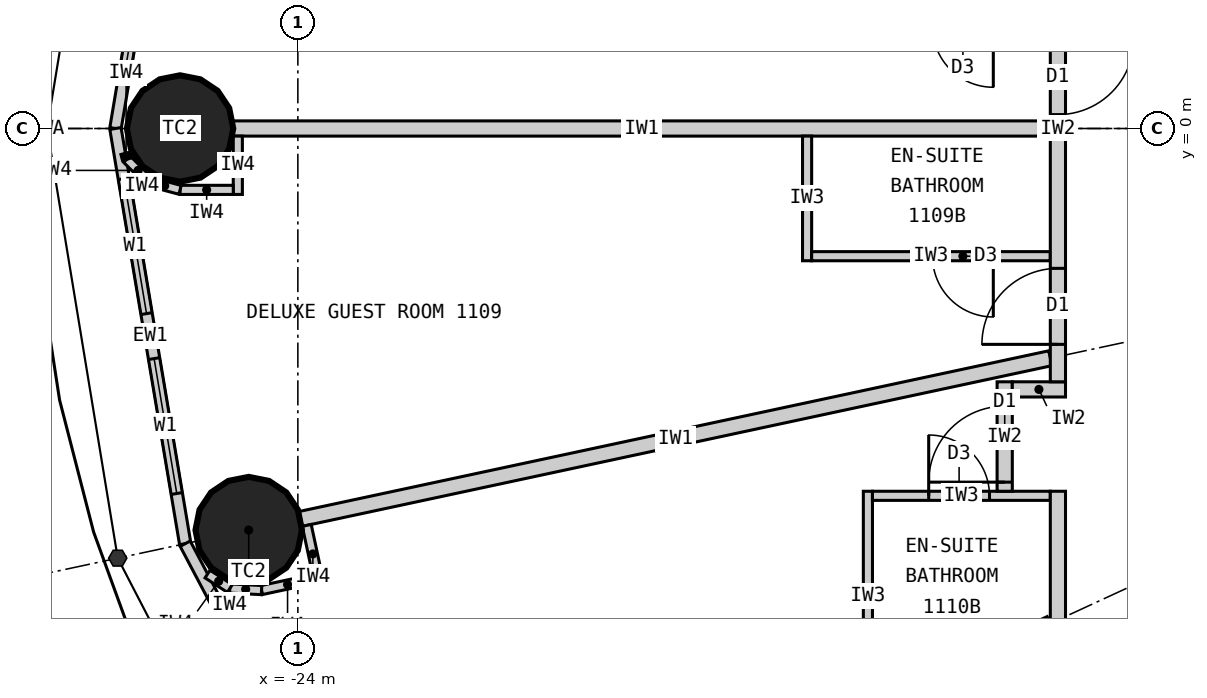
"""IFC4 building model, lengths in metres.
Left out: names, types, materials, properties, quantities, classifications, styles, units other than length and angle.
Written with IfcOpenShell. Run it as: python <this file> out.ifc"""

import sys

from ifc_helpers import new_model, si_unit, direction, frame, frame_2d, origin, origin_2d, place, context, subcontext, project, spatial, rectangle, circle, extrude, element, fill, save


model = new_model("IFC4")
c1 = context("Model", 3, precision=1e-05, world=origin(), true_north=direction((0.0, 1.0)))
c2 = subcontext(c1, "Body", "Model", "MODEL_VIEW")
j1 = project(units=[si_unit("LENGTHUNIT", "METRE"), si_unit("PLANEANGLEUNIT", "RADIAN")], contexts=[c1])
p1 = place(None, origin())
s1 = spatial("IfcSite", under=j1, at=p1, CompositionType="ELEMENT")
p2 = place(p1, origin())
s2 = spatial("IfcBuilding", under=s1, at=p2, CompositionType="ELEMENT")
p3 = place(p2, frame((0.0, 0.0, 50.7)))
s3 = spatial("IfcBuildingStorey", under=s2, at=p3, CompositionType="ELEMENT", Elevation=50.7)
for number, where, z_axis, x_axis in (
    (1, (-25.55, 0.0, 0.0), (0.0, 0.0, 1.0), (1.0, 0.0, 0.0)),
    (2, (-24.647, -5.283, 0.0), (0.0, 0.0, 1.0), (1.0, 0.0, 0.0)),
):
    element("IfcColumn", number, at=place(p3, frame(where, z_axis=z_axis, x_axis=x_axis)), inside=s3, PredefinedType="COLUMN", context=c2, shape_type="SweptSolid", body=[
        extrude(circle(Radius=0.7, at=origin_2d()), origin(), (0.0, 0.0, 1.0), 3.3),
    ])
p4 = place(p3, frame((-25.482, 5.462, 0.0), z_axis=(0.0, 0.0, 1.0), x_axis=(-0.165642551694, -0.986185857264, 0.0)))
e3 = element("IfcWall", 3, at=p4, inside=s3, PredefinedType="ELEMENTEDWALL", context=c2, shape_type="SweptSolid", body=[
    extrude(rectangle(XDim=5.539, YDim=0.15, at=frame_2d((2.77, 0.0))), origin(), (0.0, 0.0, 1.0), 3.12),
])
p5 = place(p4, frame((0.669, 0.0, 0.9)))
e4 = element("IfcOpeningElement", 4, at=p5, cuts=e3, PredefinedType="OPENING", context=c2, shape_type="SweptSolid", body=[
    extrude(rectangle(XDim=1.8, YDim=1.9, at=frame_2d((0.9, 0.95))), frame((0.0, 0.085, 0.0), z_axis=(0.0, -1.0, 0.0), x_axis=(1.0, 0.0, 0.0)), (0.0, 0.0, 1.0), 0.17),
])
p6 = place(p4, frame((3.07, 0.0, 0.9)))
e5 = element("IfcOpeningElement", 5, at=p6, cuts=e3, PredefinedType="OPENING", context=c2, shape_type="SweptSolid", body=[
    extrude(rectangle(XDim=1.8, YDim=1.9, at=frame_2d((0.9, 0.95))), frame((0.0, 0.085, 0.0), z_axis=(0.0, -1.0, 0.0), x_axis=(1.0, 0.0, 0.0)), (0.0, 0.0, 1.0), 0.17),
])
p7 = place(p3, frame((-26.4, 0.0, 0.0), z_axis=(0.0, 0.0, 1.0), x_axis=(0.165642551694, -0.986185857264, 0.0)))
e6 = element("IfcWall", 6, at=p7, inside=s3, PredefinedType="ELEMENTEDWALL", context=c2, shape_type="SweptSolid", body=[
    extrude(rectangle(XDim=5.539, YDim=0.15, at=frame_2d((2.77, 0.0))), origin(), (0.0, 0.0, 1.0), 3.12),
])
p8 = place(p7, frame((0.669, 0.0, 0.9)))
e7 = element("IfcOpeningElement", 7, at=p8, cuts=e6, PredefinedType="OPENING", context=c2, shape_type="SweptSolid", body=[
    extrude(rectangle(XDim=1.8, YDim=1.9, at=frame_2d((0.9, 0.95))), frame((0.0, 0.085, 0.0), z_axis=(0.0, -1.0, 0.0), x_axis=(1.0, 0.0, 0.0)), (0.0, 0.0, 1.0), 0.17),
])
p9 = place(p7, frame((3.07, 0.0, 0.9)))
e8 = element("IfcOpeningElement", 8, at=p9, cuts=e6, PredefinedType="OPENING", context=c2, shape_type="SweptSolid", body=[
    extrude(rectangle(XDim=1.8, YDim=1.9, at=frame_2d((0.9, 0.95))), frame((0.0, 0.085, 0.0), z_axis=(0.0, -1.0, 0.0), x_axis=(1.0, 0.0, 0.0)), (0.0, 0.0, 1.0), 0.17),
])
p10 = place(p3, frame((-25.482, -5.462, 0.0), z_axis=(0.0, 0.0, 1.0), x_axis=(0.467296867008, -0.884100468321, 0.0)))
e9 = element("IfcWall", 9, at=p10, inside=s3, PredefinedType="ELEMENTEDWALL", context=c2, shape_type="SweptSolid", body=[
    extrude(rectangle(XDim=5.734, YDim=0.15, at=frame_2d((2.867, 0.0))), origin(), (0.0, 0.0, 1.0), 3.12),
])
p11 = place(p10, frame((0.767, 0.0, 0.9)))
e10 = element("IfcOpeningElement", 10, at=p11, cuts=e9, PredefinedType="OPENING", context=c2, shape_type="SweptSolid", body=[
    extrude(rectangle(XDim=1.8, YDim=1.9, at=frame_2d((0.9, 0.95))), frame((0.0, 0.085, 0.0), z_axis=(0.0, -1.0, 0.0), x_axis=(1.0, 0.0, 0.0)), (0.0, 0.0, 1.0), 0.17),
])
p12 = place(p10, frame((3.167, 0.0, 0.9)))
e11 = element("IfcOpeningElement", 11, at=p12, cuts=e9, PredefinedType="OPENING", context=c2, shape_type="SweptSolid", body=[
    extrude(rectangle(XDim=1.8, YDim=1.9, at=frame_2d((0.9, 0.95))), frame((0.0, 0.085, 0.0), z_axis=(0.0, -1.0, 0.0), x_axis=(1.0, 0.0, 0.0)), (0.0, 0.0, 1.0), 0.17),
])
p13 = place(p3, frame((-14.1, 0.0, 0.0), z_axis=(0.0, 0.0, 1.0), x_axis=(-1.0, 0.0, 0.0)))
e12 = element("IfcWall", 12, at=p13, inside=s3, PredefinedType="PARTITIONING", context=c2, shape_type="SweptSolid", body=[
    extrude(rectangle(XDim=10.75, YDim=0.2, at=frame_2d((5.375, 0.0))), origin(), (0.0, 0.0, 1.0), 2.27),
])
p14 = place(p3, frame((-14.1, -3.022, 0.0), z_axis=(0.0, 0.0, 1.0), x_axis=(-0.977790014929, -0.209586943072, 0.0)))
e13 = element("IfcWall", 13, at=p14, inside=s3, PredefinedType="PARTITIONING", context=c2, shape_type="SweptSolid", body=[
    extrude(rectangle(XDim=10.087, YDim=0.2, at=frame_2d((5.043, 0.0))), origin(), (0.0, 0.0, 1.0), 2.32),
])
p15 = place(p3, frame((-14.1, -6.512, 0.0), z_axis=(0.0, 0.0, 1.0), x_axis=(-0.907832871056, -0.419332181247, 0.0)))
e14 = element("IfcWall", 14, at=p15, inside=s3, PredefinedType="PARTITIONING", context=c2, shape_type="SweptSolid", body=[
    extrude(rectangle(XDim=8.023, YDim=0.2, at=frame_2d((4.011, 0.0))), origin(), (0.0, 0.0, 1.0), 2.32),
])
p16 = place(p3, frame((-17.3, -0.1, 0.0), z_axis=(0.0, 0.0, 1.0), x_axis=(0.0, -1.0, 0.0)))
e15 = element("IfcWall", 15, at=p16, inside=s3, PredefinedType="PARTITIONING", context=c2, shape_type="SweptSolid", body=[
    extrude(rectangle(XDim=1.64, YDim=0.12, at=frame_2d((0.82, 0.0))), origin(), (0.0, 0.0, 1.0), 3.12),
])
p17 = place(p3, frame((-14.1, -1.68, 0.0), z_axis=(0.0, 0.0, 1.0), x_axis=(-1.0, 0.0, 0.0)))
e16 = element("IfcWall", 16, at=p17, inside=s3, PredefinedType="PARTITIONING", context=c2, shape_type="SweptSolid", body=[
    extrude(rectangle(XDim=3.14, YDim=0.12, at=frame_2d((1.57, 0.0))), origin(), (0.0, 0.0, 1.0), 3.12),
])
p18 = place(p17, frame((0.75, 0.0, 0.0)))
e17 = element("IfcOpeningElement", 17, at=p18, cuts=e16, PredefinedType="OPENING", context=c2, shape_type="SweptSolid", body=[
    extrude(rectangle(XDim=0.8, YDim=2.1, at=frame_2d((0.4, 1.05))), frame((0.0, 0.07, 0.0), z_axis=(0.0, -1.0, 0.0), x_axis=(1.0, 0.0, 0.0)), (0.0, 0.0, 1.0), 0.14),
])
p19 = place(p3, frame((-16.5, -7.521, 0.0), z_axis=(0.0, 0.0, 1.0), x_axis=(0.0, 1.0, 0.0)))
e18 = element("IfcWall", 18, at=p19, inside=s3, PredefinedType="PARTITIONING", context=c2, shape_type="SweptSolid", body=[
    extrude(rectangle(XDim=2.749, YDim=0.12, at=frame_2d((1.374, 0.0))), origin(), (0.0, 0.0, 1.0), 3.12),
])
p20 = place(p3, frame((-14.1, -4.833, 0.0), z_axis=(0.0, 0.0, 1.0), x_axis=(-1.0, 0.0, 0.0)))
e19 = element("IfcWall", 19, at=p20, inside=s3, PredefinedType="PARTITIONING", context=c2, shape_type="SweptSolid", body=[
    extrude(rectangle(XDim=2.34, YDim=0.12, at=frame_2d((1.17, 0.0))), origin(), (0.0, 0.0, 1.0), 3.12),
])
p21 = place(p20, frame((0.8, 0.0, 0.0)))
e20 = element("IfcOpeningElement", 20, at=p21, cuts=e19, PredefinedType="OPENING", context=c2, shape_type="SweptSolid", body=[
    extrude(rectangle(XDim=0.8, YDim=2.1, at=frame_2d((0.4, 1.05))), frame((0.0, 0.07, 0.0), z_axis=(0.0, -1.0, 0.0), x_axis=(1.0, 0.0, 0.0)), (0.0, 0.0, 1.0), 0.14),
])
p22 = place(p3, frame((-14.7, -3.333, 0.0), z_axis=(0.0, 0.0, 1.0), x_axis=(0.0, -1.0, 0.0)))
e21 = element("IfcWall", 21, at=p22, inside=s3, PredefinedType="PARTITIONING", context=c2, shape_type="SweptSolid", body=[
    extrude(rectangle(XDim=1.44, YDim=0.2, at=frame_2d((0.72, 0.0))), origin(), (0.0, 0.0, 1.0), 3.12),
])
p23 = place(p22, frame((0.32, 0.0, 0.0)))
e22 = element("IfcOpeningElement", 22, at=p23, cuts=e21, PredefinedType="OPENING", context=c2, shape_type="SweptSolid", body=[
    extrude(rectangle(XDim=1.0, YDim=2.2, at=frame_2d((0.5, 1.1))), frame((0.0, 0.11, 0.0), z_axis=(0.0, -1.0, 0.0), x_axis=(1.0, 0.0, 0.0)), (0.0, 0.0, 1.0), 0.22),
])
p24 = place(p3, frame((-13.9, -3.433, 0.0), z_axis=(0.0, 0.0, 1.0), x_axis=(-1.0, 0.0, 0.0)))
e23 = element("IfcWall", 23, at=p24, inside=s3, PredefinedType="PARTITIONING", context=c2, shape_type="SweptSolid", body=[
    extrude(rectangle(XDim=0.7, YDim=0.2, at=frame_2d((0.35, 0.0))), origin(), (0.0, 0.0, 1.0), 2.32),
])
p25 = place(p3, frame((-14.0, 3.333, 0.0), z_axis=(0.0, 0.0, 1.0), x_axis=(0.0, -1.0, 0.0)))
e24 = element("IfcWall", 24, at=p25, inside=s3, PredefinedType="PARTITIONING", context=c2, shape_type="SweptSolid", body=[
    extrude(rectangle(XDim=6.665, YDim=0.2, at=frame_2d((3.333, 0.0))), origin(), (0.0, 0.0, 1.0), 3.12),
])
p26 = place(p25, frame((2.15, 0.0, 0.0)))
e25 = element("IfcOpeningElement", 25, at=p26, cuts=e24, PredefinedType="OPENING", context=c2, shape_type="SweptSolid", body=[
    extrude(rectangle(XDim=1.0, YDim=2.2, at=frame_2d((0.5, 1.1))), frame((0.0, 0.11, 0.0), z_axis=(0.0, -1.0, 0.0), x_axis=(1.0, 0.0, 0.0)), (0.0, 0.0, 1.0), 0.22),
])
p27 = place(p25, frame((5.173, 0.0, 0.0)))
e26 = element("IfcOpeningElement", 26, at=p27, cuts=e24, PredefinedType="OPENING", context=c2, shape_type="SweptSolid", body=[
    extrude(rectangle(XDim=1.0, YDim=2.2, at=frame_2d((0.5, 1.1))), frame((0.0, 0.11, 0.0), z_axis=(0.0, -1.0, 0.0), x_axis=(1.0, 0.0, 0.0)), (0.0, 0.0, 1.0), 0.22),
])
p28 = place(p3, frame((-14.0, -4.772, 0.0), z_axis=(0.0, 0.0, 1.0), x_axis=(0.0, -1.0, 0.0)))
e27 = element("IfcWall", 27, at=p28, inside=s3, PredefinedType="PARTITIONING", context=c2, shape_type="SweptSolid", body=[
    extrude(rectangle(XDim=5.127, YDim=0.2, at=frame_2d((2.564, 0.0))), origin(), (0.0, 0.0, 1.0), 3.12),
])
p29 = place(p28, frame((4.025, 0.0, 0.0)))
e28 = element("IfcOpeningElement", 28, at=p29, cuts=e27, PredefinedType="OPENING", context=c2, shape_type="SweptSolid", body=[
    extrude(rectangle(XDim=1.0, YDim=2.2, at=frame_2d((0.5, 1.1))), frame((0.0, 0.11, 0.0), z_axis=(0.0, -1.0, 0.0), x_axis=(1.0, 0.0, 0.0)), (0.0, 0.0, 1.0), 0.22),
])
p30 = place(p3, frame((-24.79, -0.1, 0.0), z_axis=(0.0, 0.0, 1.0), x_axis=(0.0, -1.0, 0.0)))
e29 = element("IfcWall", 29, at=p30, inside=s3, PredefinedType="PARTITIONING", context=c2, shape_type="SweptSolid", body=[
    extrude(rectangle(XDim=0.767, YDim=0.12, at=frame_2d((0.384, 0.0))), origin(), (0.0, 0.0, 1.0), 3.12),
])
p31 = place(p3, frame((-24.85, -0.808, 0.0), z_axis=(0.0, 0.0, 1.0), x_axis=(-1.0, 0.0, 0.0)))
e30 = element("IfcWall", 30, at=p31, inside=s3, PredefinedType="PARTITIONING", context=c2, shape_type="SweptSolid", body=[
    extrude(rectangle(XDim=0.7, YDim=0.12, at=frame_2d((0.35, 0.0))), origin(), (0.0, 0.0, 1.0), 3.12),
])
p32 = place(p3, frame((-25.55, -0.808, 0.0), z_axis=(0.0, 0.0, 1.0), x_axis=(-0.965807183573, 0.2592614205, 0.0)))
e31 = element("IfcWall", 31, at=p32, inside=s3, PredefinedType="PARTITIONING", context=c2, shape_type="SweptSolid", body=[
    extrude(rectangle(XDim=0.418, YDim=0.12, at=frame_2d((0.209, 0.0))), origin(), (0.0, 0.0, 1.0), 3.12),
])
p33 = place(p3, frame((-25.954, -0.699, 0.0), z_axis=(0.0, 0.0, 1.0), x_axis=(-0.707106781187, 0.707106781187, 0.0)))
e32 = element("IfcWall", 32, at=p33, inside=s3, PredefinedType="PARTITIONING", context=c2, shape_type="SweptSolid", body=[
    extrude(rectangle(XDim=0.418, YDim=0.12, at=frame_2d((0.209, 0.0))), origin(), (0.0, 0.0, 1.0), 3.12),
])
p34 = place(p3, frame((-26.249, -0.404, 0.0), z_axis=(0.0, 0.0, 1.0), x_axis=(-0.259754282609, 0.965674744759, 0.0)))
e33 = element("IfcWall", 33, at=p34, inside=s3, PredefinedType="PARTITIONING", context=c2, shape_type="SweptSolid", body=[
    extrude(rectangle(XDim=0.08, YDim=0.12, at=frame_2d((0.04, 0.0))), origin(), (0.0, 0.0, 1.0), 3.12),
])
p35 = place(p3, frame((-23.883, -5.222, 0.0), z_axis=(0.0, 0.0, 1.0), x_axis=(0.209311842415, -0.977848941619, 0.0)))
e34 = element("IfcWall", 34, at=p35, inside=s3, PredefinedType="PARTITIONING", context=c2, shape_type="SweptSolid", body=[
    extrude(rectangle(XDim=0.768, YDim=0.12, at=frame_2d((0.384, 0.0))), origin(), (0.0, 0.0, 1.0), 3.12),
])
p36 = place(p3, frame((-23.793, -5.926, 0.0), z_axis=(0.0, 0.0, 1.0), x_axis=(-0.977792206673, -0.209576717621, 0.0)))
e35 = element("IfcWall", 35, at=p36, inside=s3, PredefinedType="PARTITIONING", context=c2, shape_type="SweptSolid", body=[
    extrude(rectangle(XDim=0.7, YDim=0.12, at=frame_2d((0.35, 0.0))), origin(), (0.0, 0.0, 1.0), 3.12),
])
p37 = place(p3, frame((-24.478, -6.073, 0.0), z_axis=(0.0, 0.0, 1.0), x_axis=(-0.998708262812, 0.05081147302, 0.0)))
e36 = element("IfcWall", 36, at=p37, inside=s3, PredefinedType="PARTITIONING", context=c2, shape_type="SweptSolid", body=[
    extrude(rectangle(XDim=0.418, YDim=0.12, at=frame_2d((0.209, 0.0))), origin(), (0.0, 0.0, 1.0), 3.12),
])
p38 = place(p3, frame((-24.895, -6.052, 0.0), z_axis=(0.0, 0.0, 1.0), x_axis=(-0.839495197275, 0.54336710772, 0.0)))
e37 = element("IfcWall", 37, at=p38, inside=s3, PredefinedType="PARTITIONING", context=c2, shape_type="SweptSolid", body=[
    extrude(rectangle(XDim=0.35, YDim=0.12, at=frame_2d((0.175, 0.0))), origin(), (0.0, 0.0, 1.0), 3.12),
])
p39 = place(p6, origin())
e38 = element("IfcWindow", 38, at=p39, inside=s3, PartitioningType="SINGLE_PANEL", PredefinedType="WINDOW", context=c2, shape_type="SweptSolid", body=[
    extrude(rectangle(XDim=1.8, YDim=1.9, at=frame_2d((0.9, 0.95))), frame((0.0, 0.03, 0.0), z_axis=(0.0, -1.0, 0.0), x_axis=(1.0, 0.0, 0.0)), (0.0, 0.0, 1.0), 0.06),
])
fill(e5, e38)
p40 = place(p8, origin())
e39 = element("IfcWindow", 39, at=p40, inside=s3, PartitioningType="SINGLE_PANEL", PredefinedType="WINDOW", context=c2, shape_type="SweptSolid", body=[
    extrude(rectangle(XDim=1.8, YDim=1.9, at=frame_2d((0.9, 0.95))), frame((0.0, 0.03, 0.0), z_axis=(0.0, -1.0, 0.0), x_axis=(1.0, 0.0, 0.0)), (0.0, 0.0, 1.0), 0.06),
])
fill(e7, e39)
p41 = place(p9, origin())
e40 = element("IfcWindow", 40, at=p41, inside=s3, PartitioningType="SINGLE_PANEL", PredefinedType="WINDOW", context=c2, shape_type="SweptSolid", body=[
    extrude(rectangle(XDim=1.8, YDim=1.9, at=frame_2d((0.9, 0.95))), frame((0.0, 0.03, 0.0), z_axis=(0.0, -1.0, 0.0), x_axis=(1.0, 0.0, 0.0)), (0.0, 0.0, 1.0), 0.06),
])
fill(e8, e40)
p42 = place(p11, origin())
e41 = element("IfcWindow", 41, at=p42, inside=s3, PartitioningType="SINGLE_PANEL", PredefinedType="WINDOW", context=c2, shape_type="SweptSolid", body=[
    extrude(rectangle(XDim=1.8, YDim=1.9, at=frame_2d((0.9, 0.95))), frame((0.0, 0.03, 0.0), z_axis=(0.0, -1.0, 0.0), x_axis=(1.0, 0.0, 0.0)), (0.0, 0.0, 1.0), 0.06),
])
fill(e10, e41)
p43 = place(p26, origin())
e42 = element("IfcDoor", 42, at=p43, inside=s3, OperationType="SINGLE_SWING_LEFT", PredefinedType="DOOR", context=c2, shape_type="SweptSolid", body=[
    extrude(rectangle(XDim=1.0, YDim=2.2, at=frame_2d((0.5, 1.1))), frame((0.0, 0.025, 0.0), z_axis=(0.0, -1.0, 0.0), x_axis=(1.0, 0.0, 0.0)), (0.0, 0.0, 1.0), 0.05),
])
fill(e25, e42)
p44 = place(p18, origin())
e43 = element("IfcDoor", 43, at=p44, inside=s3, OperationType="SINGLE_SWING_LEFT", PredefinedType="DOOR", context=c2, shape_type="SweptSolid", body=[
    extrude(rectangle(XDim=0.8, YDim=2.1, at=frame_2d((0.4, 1.05))), frame((0.0, 0.025, 0.0), z_axis=(0.0, -1.0, 0.0), x_axis=(1.0, 0.0, 0.0)), (0.0, 0.0, 1.0), 0.05),
])
fill(e17, e43)
p45 = place(p27, origin())
e44 = element("IfcDoor", 44, at=p45, inside=s3, OperationType="SINGLE_SWING_RIGHT", PredefinedType="DOOR", context=c2, shape_type="SweptSolid", body=[
    extrude(rectangle(XDim=1.0, YDim=2.2, at=frame_2d((0.5, 1.1))), frame((0.0, 0.025, 0.0), z_axis=(0.0, -1.0, 0.0), x_axis=(1.0, 0.0, 0.0)), (0.0, 0.0, 1.0), 0.05),
])
fill(e26, e44)
p46 = place(p21, origin())
e45 = element("IfcDoor", 45, at=p46, inside=s3, OperationType="SINGLE_SWING_RIGHT", PredefinedType="DOOR", context=c2, shape_type="SweptSolid", body=[
    extrude(rectangle(XDim=0.8, YDim=2.1, at=frame_2d((0.4, 1.05))), frame((0.0, 0.025, 0.0), z_axis=(0.0, -1.0, 0.0), x_axis=(1.0, 0.0, 0.0)), (0.0, 0.0, 1.0), 0.05),
])
fill(e20, e45)
p47 = place(p23, origin())
e46 = element("IfcDoor", 46, at=p47, inside=s3, OperationType="SINGLE_SWING_RIGHT", PredefinedType="DOOR", context=c2, shape_type="SweptSolid", body=[
    extrude(rectangle(XDim=1.0, YDim=2.2, at=frame_2d((0.5, 1.1))), frame((0.0, 0.025, 0.0), z_axis=(0.0, -1.0, 0.0), x_axis=(1.0, 0.0, 0.0)), (0.0, 0.0, 1.0), 0.05),
])
fill(e22, e46)
save(model, sys.argv[1])
